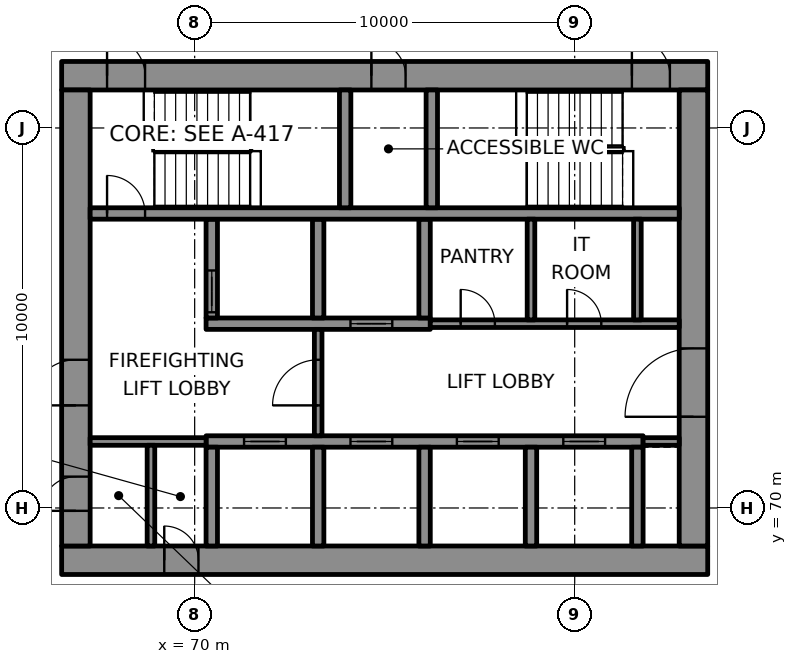
"""IFC4 building model, lengths in metres.
Left out: names, types, materials, properties, quantities, classifications, styles, units other than length and angle.
Written with IfcOpenShell. Run it as: python <this file> out.ifc"""

import sys

from ifc_helpers import new_model, si_unit, direction, frame, frame_2d, origin, place, context, subcontext, project, spatial, rectangle, extrude, element, fill, save


model = new_model("IFC4")
c1 = context("Model", 3, precision=1e-05, world=origin(), true_north=direction((0.0, 1.0)))
c2 = subcontext(c1, "Body", "Model", "MODEL_VIEW")
j1 = project(units=[si_unit("LENGTHUNIT", "METRE"), si_unit("PLANEANGLEUNIT", "RADIAN")], contexts=[c1])
p1 = place(None, origin())
s1 = spatial("IfcSite", under=j1, at=p1, CompositionType="ELEMENT")
p2 = place(p1, origin())
s2 = spatial("IfcBuilding", under=s1, at=p2, CompositionType="ELEMENT")
p3 = place(p2, frame((0.0, 0.0, 267.1)))
s3 = spatial("IfcBuildingStorey", under=s2, at=p3, CompositionType="ELEMENT", Elevation=267.1)
p4 = place(p3, frame((66.5, 68.625, 0.0), z_axis=(0.0, 0.0, 1.0), x_axis=(1.0, 0.0, 0.0)))
e1 = element("IfcWall", 1, at=p4, inside=s3, PredefinedType="SHEAR", context=c2, shape_type="SweptSolid", body=[
    extrude(rectangle(XDim=17.0, YDim=0.75, at=frame_2d((8.5, 0.0))), origin(), (0.0, 0.0, 1.0), 3.3),
])
p5 = place(p4, frame((2.7, 0.0, 0.0)))
e2 = element("IfcOpeningElement", 2, at=p5, cuts=e1, PredefinedType="OPENING", context=c2, shape_type="SweptSolid", body=[
    extrude(rectangle(XDim=0.9, YDim=2.1, at=frame_2d((0.45, 1.05))), frame((0.0, 0.385, 0.0), z_axis=(0.0, -1.0, 0.0), x_axis=(1.0, 0.0, 0.0)), (0.0, 0.0, 1.0), 0.77),
])
p6 = place(p3, frame((66.5, 81.375, 0.0), z_axis=(0.0, 0.0, 1.0), x_axis=(1.0, 0.0, 0.0)))
e3 = element("IfcWall", 3, at=p6, inside=s3, PredefinedType="SHEAR", context=c2, shape_type="SweptSolid", body=[
    extrude(rectangle(XDim=17.0, YDim=0.75, at=frame_2d((8.5, 0.0))), origin(), (0.0, 0.0, 1.0), 3.3),
])
p7 = place(p6, frame((1.195, 0.0, 0.0)))
e4 = element("IfcOpeningElement", 4, at=p7, cuts=e3, PredefinedType="OPENING", context=c2, shape_type="SweptSolid", body=[
    extrude(rectangle(XDim=1.0, YDim=2.1, at=frame_2d((0.5, 1.05))), frame((0.0, 0.385, 0.0), z_axis=(0.0, -1.0, 0.0), x_axis=(1.0, 0.0, 0.0)), (0.0, 0.0, 1.0), 0.77),
])
p8 = place(p6, frame((15.005, 0.0, 0.0)))
e5 = element("IfcOpeningElement", 5, at=p8, cuts=e3, PredefinedType="OPENING", context=c2, shape_type="SweptSolid", body=[
    extrude(rectangle(XDim=1.0, YDim=2.1, at=frame_2d((0.5, 1.05))), frame((0.0, 0.385, 0.0), z_axis=(0.0, -1.0, 0.0), x_axis=(1.0, 0.0, 0.0)), (0.0, 0.0, 1.0), 0.77),
])
p9 = place(p6, frame((8.15, 0.0, 0.0)))
e6 = element("IfcOpeningElement", 6, at=p9, cuts=e3, PredefinedType="OPENING", context=c2, shape_type="SweptSolid", body=[
    extrude(rectangle(XDim=0.9, YDim=2.1, at=frame_2d((0.45, 1.05))), frame((0.0, 0.385, 0.0), z_axis=(0.0, -1.0, 0.0), x_axis=(1.0, 0.0, 0.0)), (0.0, 0.0, 1.0), 0.77),
])
p10 = place(p3, frame((66.875, 69.0, 0.0), z_axis=(0.0, 0.0, 1.0), x_axis=(0.0, 1.0, 0.0)))
e7 = element("IfcWall", 7, at=p10, inside=s3, PredefinedType="SHEAR", context=c2, shape_type="SweptSolid", body=[
    extrude(rectangle(XDim=12.0, YDim=0.75, at=frame_2d((6.0, 0.0))), origin(), (0.0, 0.0, 1.0), 3.3),
])
p11 = place(p10, frame((3.7, 0.0, 0.0)))
e8 = element("IfcOpeningElement", 8, at=p11, cuts=e7, PredefinedType="OPENING", context=c2, shape_type="SweptSolid", body=[
    extrude(rectangle(XDim=1.2, YDim=2.1, at=frame_2d((0.6, 1.05))), frame((0.0, 0.385, 0.0), z_axis=(0.0, -1.0, 0.0), x_axis=(1.0, 0.0, 0.0)), (0.0, 0.0, 1.0), 0.77),
])
p12 = place(p10, frame((0.925, 0.0, 0.0)))
e9 = element("IfcOpeningElement", 9, at=p12, cuts=e7, PredefinedType="OPENING", context=c2, shape_type="SweptSolid", body=[
    extrude(rectangle(XDim=0.9, YDim=2.1, at=frame_2d((0.45, 1.05))), frame((0.0, 0.385, 0.0), z_axis=(0.0, -1.0, 0.0), x_axis=(1.0, 0.0, 0.0)), (0.0, 0.0, 1.0), 0.77),
])
p13 = place(p3, frame((83.125, 69.0, 0.0), z_axis=(0.0, 0.0, 1.0), x_axis=(0.0, 1.0, 0.0)))
e10 = element("IfcWall", 10, at=p13, inside=s3, PredefinedType="SHEAR", context=c2, shape_type="SweptSolid", body=[
    extrude(rectangle(XDim=12.0, YDim=0.75, at=frame_2d((6.0, 0.0))), origin(), (0.0, 0.0, 1.0), 3.3),
])
p14 = place(p13, frame((3.4, 0.0, 0.0)))
e11 = element("IfcOpeningElement", 11, at=p14, cuts=e10, PredefinedType="OPENING", context=c2, shape_type="SweptSolid", body=[
    extrude(rectangle(XDim=1.8, YDim=2.1, at=frame_2d((0.9, 1.05))), frame((0.0, 0.385, 0.0), z_axis=(0.0, -1.0, 0.0), x_axis=(1.0, 0.0, 0.0)), (0.0, 0.0, 1.0), 0.77),
])
p15 = place(p3, frame((70.3, 71.75, 0.0), z_axis=(0.0, 0.0, 1.0), x_axis=(1.0, 0.0, 0.0)))
e12 = element("IfcWall", 12, at=p15, inside=s3, PredefinedType="SHEAR", context=c2, shape_type="SweptSolid", body=[
    extrude(rectangle(XDim=11.5, YDim=0.3, at=frame_2d((5.75, 0.0))), origin(), (0.0, 0.0, 1.0), 3.3),
])
p16 = place(p15, frame((1.0, 0.0, 0.0)))
e13 = element("IfcOpeningElement", 13, at=p16, cuts=e12, PredefinedType="OPENING", context=c2, shape_type="SweptSolid", body=[
    extrude(rectangle(XDim=1.1, YDim=2.1, at=frame_2d((0.55, 1.05))), frame((0.0, 0.16, 0.0), z_axis=(0.0, -1.0, 0.0), x_axis=(1.0, 0.0, 0.0)), (0.0, 0.0, 1.0), 0.32),
])
p17 = place(p15, frame((3.8, 0.0, 0.0)))
e14 = element("IfcOpeningElement", 14, at=p17, cuts=e12, PredefinedType="OPENING", context=c2, shape_type="SweptSolid", body=[
    extrude(rectangle(XDim=1.1, YDim=2.1, at=frame_2d((0.55, 1.05))), frame((0.0, 0.16, 0.0), z_axis=(0.0, -1.0, 0.0), x_axis=(1.0, 0.0, 0.0)), (0.0, 0.0, 1.0), 0.32),
])
p18 = place(p15, frame((6.6, 0.0, 0.0)))
e15 = element("IfcOpeningElement", 15, at=p18, cuts=e12, PredefinedType="OPENING", context=c2, shape_type="SweptSolid", body=[
    extrude(rectangle(XDim=1.1, YDim=2.1, at=frame_2d((0.55, 1.05))), frame((0.0, 0.16, 0.0), z_axis=(0.0, -1.0, 0.0), x_axis=(1.0, 0.0, 0.0)), (0.0, 0.0, 1.0), 0.32),
])
p19 = place(p15, frame((9.4, 0.0, 0.0)))
e16 = element("IfcOpeningElement", 16, at=p19, cuts=e12, PredefinedType="OPENING", context=c2, shape_type="SweptSolid", body=[
    extrude(rectangle(XDim=1.1, YDim=2.1, at=frame_2d((0.55, 1.05))), frame((0.0, 0.16, 0.0), z_axis=(0.0, -1.0, 0.0), x_axis=(1.0, 0.0, 0.0)), (0.0, 0.0, 1.0), 0.32),
])
p20 = place(p3, frame((70.3, 74.85, 0.0), z_axis=(0.0, 0.0, 1.0), x_axis=(1.0, 0.0, 0.0)))
e17 = element("IfcWall", 17, at=p20, inside=s3, PredefinedType="SHEAR", context=c2, shape_type="SweptSolid", body=[
    extrude(rectangle(XDim=5.9, YDim=0.3, at=frame_2d((2.95, 0.0))), origin(), (0.0, 0.0, 1.0), 3.3),
])
p21 = place(p20, frame((3.8, 0.0, 0.0)))
e18 = element("IfcOpeningElement", 18, at=p21, cuts=e17, PredefinedType="OPENING", context=c2, shape_type="SweptSolid", body=[
    extrude(rectangle(XDim=1.1, YDim=2.1, at=frame_2d((0.55, 1.05))), frame((0.0, 0.16, 0.0), z_axis=(0.0, -1.0, 0.0), x_axis=(1.0, 0.0, 0.0)), (0.0, 0.0, 1.0), 0.32),
])
p22 = place(p3, frame((70.45, 69.0, 0.0), z_axis=(0.0, 0.0, 1.0), x_axis=(0.0, 1.0, 0.0)))
e19 = element("IfcWall", 19, at=p22, inside=s3, PredefinedType="SHEAR", context=c2, shape_type="SweptSolid", body=[
    extrude(rectangle(XDim=2.6, YDim=0.3, at=frame_2d((1.3, 0.0))), origin(), (0.0, 0.0, 1.0), 3.3),
])
p23 = place(p3, frame((70.45, 75.0, 0.0), z_axis=(0.0, 0.0, 1.0), x_axis=(0.0, 1.0, 0.0)))
e20 = element("IfcWall", 20, at=p23, inside=s3, PredefinedType="SHEAR", context=c2, shape_type="SweptSolid", body=[
    extrude(rectangle(XDim=2.6, YDim=0.3, at=frame_2d((1.3, 0.0))), origin(), (0.0, 0.0, 1.0), 3.3),
])
p24 = place(p23, frame((0.15, 0.0, 0.0)))
e21 = element("IfcOpeningElement", 21, at=p24, cuts=e20, PredefinedType="OPENING", context=c2, shape_type="SweptSolid", body=[
    extrude(rectangle(XDim=1.1, YDim=2.1, at=frame_2d((0.55, 1.05))), frame((0.0, 0.16, 0.0), z_axis=(0.0, -1.0, 0.0), x_axis=(1.0, 0.0, 0.0)), (0.0, 0.0, 1.0), 0.32),
])
for number, where, z_axis, x_axis in (
    (22, (73.25, 69.0, 0.0), (0.0, 0.0, 1.0), (0.0, 1.0, 0.0)),
    (23, (73.25, 75.0, 0.0), (0.0, 0.0, 1.0), (0.0, 1.0, 0.0)),
    (24, (76.05, 69.0, 0.0), (0.0, 0.0, 1.0), (0.0, 1.0, 0.0)),
    (25, (76.05, 75.0, 0.0), (0.0, 0.0, 1.0), (0.0, 1.0, 0.0)),
    (26, (78.85, 69.0, 0.0), (0.0, 0.0, 1.0), (0.0, 1.0, 0.0)),
    (27, (81.65, 69.0, 0.0), (0.0, 0.0, 1.0), (0.0, 1.0, 0.0)),
):
    element("IfcWall", number, at=place(p3, frame(where, z_axis=z_axis, x_axis=x_axis)), inside=s3, PredefinedType="SHEAR", context=c2, shape_type="SweptSolid", body=[
        extrude(rectangle(XDim=2.6, YDim=0.3, at=frame_2d((1.3, 0.0))), origin(), (0.0, 0.0, 1.0), 3.3),
    ])
p25 = place(p3, frame((67.25, 77.75, 0.0), z_axis=(0.0, 0.0, 1.0), x_axis=(1.0, 0.0, 0.0)))
e28 = element("IfcWall", 28, at=p25, inside=s3, PredefinedType="SHEAR", context=c2, shape_type="SweptSolid", body=[
    extrude(rectangle(XDim=15.5, YDim=0.3, at=frame_2d((7.75, 0.0))), origin(), (0.0, 0.0, 1.0), 3.3),
])
p26 = place(p25, frame((0.445, 0.0, 0.0)))
e29 = element("IfcOpeningElement", 29, at=p26, cuts=e28, PredefinedType="OPENING", context=c2, shape_type="SweptSolid", body=[
    extrude(rectangle(XDim=1.0, YDim=2.1, at=frame_2d((0.5, 1.05))), frame((0.0, 0.16, 0.0), z_axis=(0.0, -1.0, 0.0), x_axis=(1.0, 0.0, 0.0)), (0.0, 0.0, 1.0), 0.32),
])
for number, where, z_axis, x_axis in (
    (30, (73.96, 77.9, 0.0), (0.0, 0.0, 1.0), (0.0, 1.0, 0.0)),
    (31, (76.24, 77.9, 0.0), (0.0, 0.0, 1.0), (0.0, 1.0, 0.0)),
):
    element("IfcWall", number, at=place(p3, frame(where, z_axis=z_axis, x_axis=x_axis)), inside=s3, PredefinedType="SHEAR", context=c2, shape_type="SweptSolid", body=[
        extrude(rectangle(XDim=3.1, YDim=0.3, at=frame_2d((1.55, 0.0))), origin(), (0.0, 0.0, 1.0), 3.3),
    ])
p27 = place(p3, frame((105.682, 64.079, 0.0), z_axis=(0.0, 0.0, 1.0), x_axis=(-0.500001689899, 0.866024428119, 0.0)))
e32 = element("IfcWall", 32, at=p27, inside=s3, PredefinedType="SOLIDWALL", context=c2, shape_type="SweptSolid", body=[
    extrude(rectangle(XDim=49.597, YDim=0.8, at=frame_2d((24.799, 0.0))), origin(), (0.0, 0.0, 1.0), 0.9),
])
p28 = place(p3, frame((67.25, 71.75, 0.0), z_axis=(0.0, 0.0, 1.0), x_axis=(1.0, 0.0, 0.0)))
e33 = element("IfcWall", 33, at=p28, inside=s3, PredefinedType="PARTITIONING", context=c2, shape_type="SweptSolid", body=[
    extrude(rectangle(XDim=3.05, YDim=0.2, at=frame_2d((1.525, 0.0))), origin(), (0.0, 0.0, 1.0), 3.3),
])
p29 = place(p3, frame((81.8, 71.75, 0.0), z_axis=(0.0, 0.0, 1.0), x_axis=(1.0, 0.0, 0.0)))
e34 = element("IfcWall", 34, at=p29, inside=s3, PredefinedType="PARTITIONING", context=c2, shape_type="SweptSolid", body=[
    extrude(rectangle(XDim=0.95, YDim=0.2, at=frame_2d((0.475, 0.0))), origin(), (0.0, 0.0, 1.0), 3.3),
])
p30 = place(p3, frame((76.2, 74.85, 0.0), z_axis=(0.0, 0.0, 1.0), x_axis=(1.0, 0.0, 0.0)))
e35 = element("IfcWall", 35, at=p30, inside=s3, PredefinedType="PARTITIONING", context=c2, shape_type="SweptSolid", body=[
    extrude(rectangle(XDim=6.55, YDim=0.2, at=frame_2d((3.275, 0.0))), origin(), (0.0, 0.0, 1.0), 3.3),
])
p31 = place(p30, frame((0.8, 0.0, 0.0)))
e36 = element("IfcOpeningElement", 36, at=p31, cuts=e35, PredefinedType="OPENING", context=c2, shape_type="SweptSolid", body=[
    extrude(rectangle(XDim=0.9, YDim=2.1, at=frame_2d((0.45, 1.05))), frame((0.0, 0.11, 0.0), z_axis=(0.0, -1.0, 0.0), x_axis=(1.0, 0.0, 0.0)), (0.0, 0.0, 1.0), 0.22),
])
p32 = place(p30, frame((3.6, 0.0, 0.0)))
e37 = element("IfcOpeningElement", 37, at=p32, cuts=e35, PredefinedType="OPENING", context=c2, shape_type="SweptSolid", body=[
    extrude(rectangle(XDim=0.9, YDim=2.1, at=frame_2d((0.45, 1.05))), frame((0.0, 0.11, 0.0), z_axis=(0.0, -1.0, 0.0), x_axis=(1.0, 0.0, 0.0)), (0.0, 0.0, 1.0), 0.22),
])
p33 = place(p3, frame((68.85, 69.0, 0.0), z_axis=(0.0, 0.0, 1.0), x_axis=(0.0, 1.0, 0.0)))
e38 = element("IfcWall", 38, at=p33, inside=s3, PredefinedType="PARTITIONING", context=c2, shape_type="SweptSolid", body=[
    extrude(rectangle(XDim=2.65, YDim=0.2, at=frame_2d((1.325, 0.0))), origin(), (0.0, 0.0, 1.0), 3.3),
])
p34 = place(p3, frame((73.25, 71.9, 0.0), z_axis=(0.0, 0.0, 1.0), x_axis=(0.0, 1.0, 0.0)))
e39 = element("IfcWall", 39, at=p34, inside=s3, PredefinedType="PARTITIONING", context=c2, shape_type="SweptSolid", body=[
    extrude(rectangle(XDim=2.8, YDim=0.2, at=frame_2d((1.4, 0.0))), origin(), (0.0, 0.0, 1.0), 3.3),
])
p35 = place(p34, frame((0.8, 0.0, 0.0)))
e40 = element("IfcOpeningElement", 40, at=p35, cuts=e39, PredefinedType="OPENING", context=c2, shape_type="SweptSolid", body=[
    extrude(rectangle(XDim=1.2, YDim=2.1, at=frame_2d((0.6, 1.05))), frame((0.0, 0.11, 0.0), z_axis=(0.0, -1.0, 0.0), x_axis=(1.0, 0.0, 0.0)), (0.0, 0.0, 1.0), 0.22),
])
for number, where, z_axis, x_axis in (
    (41, (78.85, 74.95, 0.0), (0.0, 0.0, 1.0), (0.0, 1.0, 0.0)),
    (42, (81.65, 74.95, 0.0), (0.0, 0.0, 1.0), (0.0, 1.0, 0.0)),
):
    element("IfcWall", number, at=place(p3, frame(where, z_axis=z_axis, x_axis=x_axis)), inside=s3, PredefinedType="PARTITIONING", context=c2, shape_type="SweptSolid", body=[
        extrude(rectangle(XDim=2.65, YDim=0.2, at=frame_2d((1.325, 0.0))), origin(), (0.0, 0.0, 1.0), 3.3),
    ])
p36 = place(p16, origin())
e43 = element("IfcDoor", 43, at=p36, inside=s3, OperationType="DOUBLE_DOOR_SLIDING", PredefinedType="DOOR", context=c2, shape_type="SweptSolid", body=[
    extrude(rectangle(XDim=1.1, YDim=2.1, at=frame_2d((0.55, 1.05))), frame((0.0, 0.025, 0.0), z_axis=(0.0, -1.0, 0.0), x_axis=(1.0, 0.0, 0.0)), (0.0, 0.0, 1.0), 0.05),
])
fill(e13, e43)
p37 = place(p17, origin())
e44 = element("IfcDoor", 44, at=p37, inside=s3, OperationType="DOUBLE_DOOR_SLIDING", PredefinedType="DOOR", context=c2, shape_type="SweptSolid", body=[
    extrude(rectangle(XDim=1.1, YDim=2.1, at=frame_2d((0.55, 1.05))), frame((0.0, 0.025, 0.0), z_axis=(0.0, -1.0, 0.0), x_axis=(1.0, 0.0, 0.0)), (0.0, 0.0, 1.0), 0.05),
])
fill(e14, e44)
p38 = place(p18, origin())
e45 = element("IfcDoor", 45, at=p38, inside=s3, OperationType="DOUBLE_DOOR_SLIDING", PredefinedType="DOOR", context=c2, shape_type="SweptSolid", body=[
    extrude(rectangle(XDim=1.1, YDim=2.1, at=frame_2d((0.55, 1.05))), frame((0.0, 0.025, 0.0), z_axis=(0.0, -1.0, 0.0), x_axis=(1.0, 0.0, 0.0)), (0.0, 0.0, 1.0), 0.05),
])
fill(e15, e45)
p39 = place(p19, origin())
e46 = element("IfcDoor", 46, at=p39, inside=s3, OperationType="DOUBLE_DOOR_SLIDING", PredefinedType="DOOR", context=c2, shape_type="SweptSolid", body=[
    extrude(rectangle(XDim=1.1, YDim=2.1, at=frame_2d((0.55, 1.05))), frame((0.0, 0.025, 0.0), z_axis=(0.0, -1.0, 0.0), x_axis=(1.0, 0.0, 0.0)), (0.0, 0.0, 1.0), 0.05),
])
fill(e16, e46)
p40 = place(p24, origin())
e47 = element("IfcDoor", 47, at=p40, inside=s3, OperationType="DOUBLE_DOOR_SLIDING", PredefinedType="DOOR", context=c2, shape_type="SweptSolid", body=[
    extrude(rectangle(XDim=1.1, YDim=2.1, at=frame_2d((0.55, 1.05))), frame((0.0, 0.025, 0.0), z_axis=(0.0, -1.0, 0.0), x_axis=(1.0, 0.0, 0.0)), (0.0, 0.0, 1.0), 0.05),
])
fill(e21, e47)
p41 = place(p21, origin())
e48 = element("IfcDoor", 48, at=p41, inside=s3, OperationType="DOUBLE_DOOR_SLIDING", PredefinedType="DOOR", context=c2, shape_type="SweptSolid", body=[
    extrude(rectangle(XDim=1.1, YDim=2.1, at=frame_2d((0.55, 1.05))), frame((0.0, 0.025, 0.0), z_axis=(0.0, -1.0, 0.0), x_axis=(1.0, 0.0, 0.0)), (0.0, 0.0, 1.0), 0.05),
])
fill(e18, e48)
p42 = place(p26, origin())
e49 = element("IfcDoor", 49, at=p42, inside=s3, OperationType="SINGLE_SWING_LEFT", PredefinedType="DOOR", context=c2, shape_type="SweptSolid", body=[
    extrude(rectangle(XDim=1.0, YDim=2.1, at=frame_2d((0.5, 1.05))), frame((0.0, 0.025, 0.0), z_axis=(0.0, -1.0, 0.0), x_axis=(1.0, 0.0, 0.0)), (0.0, 0.0, 1.0), 0.05),
])
fill(e29, e49)
p43 = place(p7, origin())
e50 = element("IfcDoor", 50, at=p43, inside=s3, OperationType="SINGLE_SWING_RIGHT", PredefinedType="DOOR", context=c2, shape_type="SweptSolid", body=[
    extrude(rectangle(XDim=1.0, YDim=2.1, at=frame_2d((0.5, 1.05))), frame((0.0, 0.095, 0.0), z_axis=(0.0, -1.0, 0.0), x_axis=(1.0, 0.0, 0.0)), (0.0, 0.0, 1.0), 0.19),
])
fill(e4, e50)
p44 = place(p8, origin())
e51 = element("IfcDoor", 51, at=p44, inside=s3, OperationType="SINGLE_SWING_LEFT", PredefinedType="DOOR", context=c2, shape_type="SweptSolid", body=[
    extrude(rectangle(XDim=1.0, YDim=2.1, at=frame_2d((0.5, 1.05))), frame((0.0, 0.095, 0.0), z_axis=(0.0, -1.0, 0.0), x_axis=(1.0, 0.0, 0.0)), (0.0, 0.0, 1.0), 0.19),
])
fill(e5, e51)
p45 = place(p35, origin())
e52 = element("IfcDoor", 52, at=p45, inside=s3, OperationType="SINGLE_SWING_LEFT", PredefinedType="DOOR", context=c2, shape_type="SweptSolid", body=[
    extrude(rectangle(XDim=1.2, YDim=2.1, at=frame_2d((0.6, 1.05))), frame((0.0, 0.025, 0.0), z_axis=(0.0, -1.0, 0.0), x_axis=(1.0, 0.0, 0.0)), (0.0, 0.0, 1.0), 0.05),
])
fill(e40, e52)
p46 = place(p11, origin())
e53 = element("IfcDoor", 53, at=p46, inside=s3, OperationType="SINGLE_SWING_RIGHT", PredefinedType="DOOR", context=c2, shape_type="SweptSolid", body=[
    extrude(rectangle(XDim=1.2, YDim=2.1, at=frame_2d((0.6, 1.05))), frame((0.0, 0.095, 0.0), z_axis=(0.0, -1.0, 0.0), x_axis=(1.0, 0.0, 0.0)), (0.0, 0.0, 1.0), 0.19),
])
fill(e8, e53)
p47 = place(p14, origin())
e54 = element("IfcDoor", 54, at=p47, inside=s3, OperationType="SINGLE_SWING_LEFT", PredefinedType="DOOR", context=c2, shape_type="SweptSolid", body=[
    extrude(rectangle(XDim=1.8, YDim=2.1, at=frame_2d((0.9, 1.05))), frame((0.0, 0.095, 0.0), z_axis=(0.0, -1.0, 0.0), x_axis=(1.0, 0.0, 0.0)), (0.0, 0.0, 1.0), 0.19),
])
fill(e11, e54)
p48 = place(p12, origin())
e55 = element("IfcDoor", 55, at=p48, inside=s3, OperationType="SINGLE_SWING_RIGHT", PredefinedType="DOOR", context=c2, shape_type="SweptSolid", body=[
    extrude(rectangle(XDim=0.9, YDim=2.1, at=frame_2d((0.45, 1.05))), frame((0.0, 0.095, 0.0), z_axis=(0.0, -1.0, 0.0), x_axis=(1.0, 0.0, 0.0)), (0.0, 0.0, 1.0), 0.19),
])
fill(e9, e55)
p49 = place(p5, origin())
e56 = element("IfcDoor", 56, at=p49, inside=s3, OperationType="SINGLE_SWING_LEFT", PredefinedType="DOOR", context=c2, shape_type="SweptSolid", body=[
    extrude(rectangle(XDim=0.9, YDim=2.1, at=frame_2d((0.45, 1.05))), frame((0.0, 0.095, 0.0), z_axis=(0.0, -1.0, 0.0), x_axis=(1.0, 0.0, 0.0)), (0.0, 0.0, 1.0), 0.19),
])
fill(e2, e56)
p50 = place(p31, origin())
e57 = element("IfcDoor", 57, at=p50, inside=s3, OperationType="SINGLE_SWING_RIGHT", PredefinedType="DOOR", context=c2, shape_type="SweptSolid", body=[
    extrude(rectangle(XDim=0.9, YDim=2.1, at=frame_2d((0.45, 1.05))), frame((0.0, 0.025, 0.0), z_axis=(0.0, -1.0, 0.0), x_axis=(1.0, 0.0, 0.0)), (0.0, 0.0, 1.0), 0.05),
])
fill(e36, e57)
p51 = place(p32, origin())
e58 = element("IfcDoor", 58, at=p51, inside=s3, OperationType="SINGLE_SWING_LEFT", PredefinedType="DOOR", context=c2, shape_type="SweptSolid", body=[
    extrude(rectangle(XDim=0.9, YDim=2.1, at=frame_2d((0.45, 1.05))), frame((0.0, 0.025, 0.0), z_axis=(0.0, -1.0, 0.0), x_axis=(1.0, 0.0, 0.0)), (0.0, 0.0, 1.0), 0.05),
])
fill(e37, e58)
p52 = place(p9, origin())
e59 = element("IfcDoor", 59, at=p52, inside=s3, OperationType="SINGLE_SWING_RIGHT", PredefinedType="DOOR", context=c2, shape_type="SweptSolid", body=[
    extrude(rectangle(XDim=0.9, YDim=2.1, at=frame_2d((0.45, 1.05))), frame((0.0, 0.095, 0.0), z_axis=(0.0, -1.0, 0.0), x_axis=(1.0, 0.0, 0.0)), (0.0, 0.0, 1.0), 0.19),
])
fill(e6, e59)
save(model, sys.argv[1])
